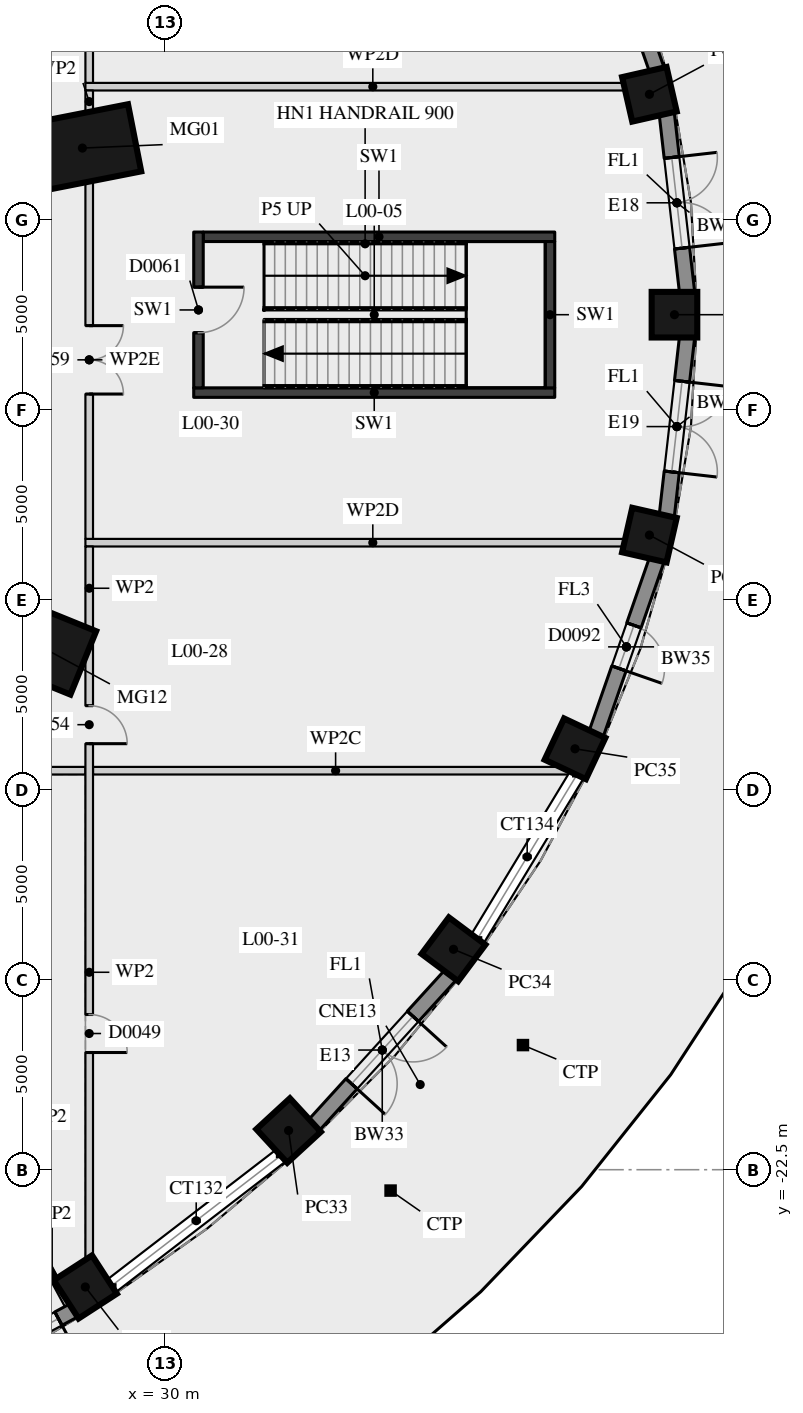
"""IFC4 building model, lengths in metres.
Left out: names, types, materials, properties, quantities, classifications, styles, units other than length and angle.
Written with IfcOpenShell. Run it as: python <this file> out.ifc"""

import sys

from ifc_helpers import new_model, si_unit, direction, frame, frame_2d, origin, origin_2d, place, context, subcontext, project, spatial, rectangle, hollow_circle, extrude, element, fill, save


model = new_model("IFC4")
c1 = context("Model", 3, precision=1e-05, world=origin(), true_north=direction((0.0, 1.0)))
c2 = subcontext(c1, "Body", "Model", "MODEL_VIEW")
j1 = project(units=[si_unit("LENGTHUNIT", "METRE"), si_unit("PLANEANGLEUNIT", "RADIAN")], contexts=[c1])
p1 = place(None, origin())
s1 = spatial("IfcSite", under=j1, at=p1, CompositionType="ELEMENT")
p2 = place(p1, origin())
s2 = spatial("IfcBuilding", under=s1, at=p2, CompositionType="ELEMENT")
p3 = place(p2, origin())
s3 = spatial("IfcBuildingStorey", under=s2, at=p3, CompositionType="ELEMENT", Elevation=0.0)
for number, where, z_axis, x_axis in (
    (1, (27.821, 4.385, 0.0), (0.0, 0.0, 1.0), (0.981, 0.193, 0.0)),
    (2, (26.546, -8.636, 0.0), (0.0, 0.0, 1.0), (0.927, -0.376, 0.0)),
):
    element("IfcColumn", number, at=place(p3, frame(where, z_axis=z_axis, x_axis=x_axis)), inside=s3, PredefinedType="COLUMN", context=c2, shape_type="SweptSolid", body=[
        extrude(rectangle(XDim=2.8, YDim=1.8, at=origin_2d()), origin(), (0.0, 0.0, 1.0), 7.5),
    ])
for number, where, z_axis, x_axis in (
    (3, (43.4, 0.0, 0.0), (0.0, 0.0, 1.0), (1.0, 0.0, 0.0)),
    (4, (42.741, 5.8, 0.0), (0.0, 0.0, 1.0), (0.975, 0.222, 0.0)),
    (5, (27.897, -25.586, 0.0), (0.0, 0.0, 1.0), (0.544, -0.839, 0.0)),
    (6, (33.246, -21.469, 0.0), (0.0, 0.0, 1.0), (0.677, -0.736, 0.0)),
    (7, (37.585, -16.7, 0.0), (0.0, 0.0, 1.0), (0.801, -0.599, 0.0)),
    (8, (40.783, -11.424, 0.0), (0.0, 0.0, 1.0), (0.905, -0.426, 0.0)),
    (9, (42.741, -5.8, 0.0), (0.0, 0.0, 1.0), (0.975, -0.222, 0.0)),
):
    element("IfcColumn", number, at=place(p3, frame(where, z_axis=z_axis, x_axis=x_axis)), inside=s3, PredefinedType="COLUMN", context=c2, shape_type="SweptSolid", body=[
        extrude(rectangle(XDim=1.2, YDim=1.2, at=origin_2d()), origin(), (0.0, 0.0, 1.0), 7.5),
    ])
p4 = place(p3, frame((43.734, 0.57, 0.0), z_axis=(0.0, 0.0, 1.0), x_axis=(-0.112954392721, 0.993600173694, 0.0)))
e10 = element("IfcWall", 10, at=p4, inside=s3, PredefinedType="SOLIDWALL", context=c2, shape_type="SweptSolid", body=[
    extrude(rectangle(XDim=4.779, YDim=0.4, at=frame_2d((2.389, 0.0))), origin(), (0.0, 0.0, 1.0), 6.19),
])
p5 = place(p4, frame((1.189, 0.0, 0.0)))
e11 = element("IfcOpeningElement", 11, at=p5, cuts=e10, PredefinedType="OPENING", context=c2, shape_type="SweptSolid", body=[
    extrude(rectangle(XDim=2.4, YDim=2.2, at=frame_2d((1.2, 1.1))), frame((0.0, 0.21, 0.0), z_axis=(0.0, -1.0, 0.0), x_axis=(1.0, 0.0, 0.0)), (0.0, 0.0, 1.0), 0.42),
])
p6 = place(p4, frame((1.189, 0.0, 2.6)))
e12 = element("IfcOpeningElement", 12, at=p6, cuts=e10, PredefinedType="OPENING", context=c2, shape_type="SweptSolid", body=[
    extrude(rectangle(XDim=2.4, YDim=3.49, at=frame_2d((1.2, 1.745))), frame((0.0, 0.21, 0.0), z_axis=(0.0, -1.0, 0.0), x_axis=(1.0, 0.0, 0.0)), (0.0, 0.0, 1.0), 0.42),
])
p7 = place(p3, frame((42.941, 6.43, 0.0), z_axis=(0.0, 0.0, 1.0), x_axis=(-0.328772164332, 0.944409267193, 0.0)))
e13 = element("IfcWall", 13, at=p7, inside=s3, PredefinedType="SOLIDWALL", context=c2, shape_type="SweptSolid", body=[
    extrude(rectangle(XDim=4.894, YDim=0.4, at=frame_2d((2.447, 0.0))), origin(), (0.0, 0.0, 1.0), 6.19),
])
p8 = place(p7, frame((0.647, 0.0, 0.0)))
e14 = element("IfcOpeningElement", 14, at=p8, cuts=e13, PredefinedType="OPENING", context=c2, shape_type="SweptSolid", body=[
    extrude(rectangle(XDim=3.6, YDim=4.5, at=frame_2d((1.8, 2.25))), frame((0.0, 0.21, 0.0), z_axis=(0.0, -1.0, 0.0), x_axis=(1.0, 0.0, 0.0)), (0.0, 0.0, 1.0), 0.42),
])
p9 = place(p7, frame((0.647, 0.0, 4.9)))
e15 = element("IfcOpeningElement", 15, at=p9, cuts=e13, PredefinedType="OPENING", context=c2, shape_type="SweptSolid", body=[
    extrude(rectangle(XDim=3.6, YDim=1.19, at=frame_2d((1.8, 0.595))), frame((0.0, 0.21, 0.0), z_axis=(0.0, -1.0, 0.0), x_axis=(1.0, 0.0, 0.0)), (0.0, 0.0, 1.0), 0.42),
])
p10 = place(p3, frame((22.366, -29.019, 0.0), z_axis=(0.0, 0.0, 1.0), x_axis=(0.880313157301, 0.474393028072, 0.0)))
e16 = element("IfcWall", 16, at=p10, inside=s3, PredefinedType="SOLIDWALL", context=c2, shape_type="SweptSolid", body=[
    extrude(rectangle(XDim=5.958, YDim=0.4, at=frame_2d((2.979, 0.0))), origin(), (0.0, 0.0, 1.0), 6.19),
])
p11 = place(p10, frame((3.079, 0.0, 0.0)))
e17 = element("IfcOpeningElement", 17, at=p11, cuts=e16, PredefinedType="OPENING", context=c2, shape_type="SweptSolid", body=[
    extrude(rectangle(XDim=2.4, YDim=2.2, at=frame_2d((1.2, 1.1))), frame((0.0, 0.21, 0.0), z_axis=(0.0, -1.0, 0.0), x_axis=(1.0, 0.0, 0.0)), (0.0, 0.0, 1.0), 0.42),
])
p12 = place(p10, frame((3.079, 0.0, 2.6)))
e18 = element("IfcOpeningElement", 18, at=p12, cuts=e16, PredefinedType="OPENING", context=c2, shape_type="SweptSolid", body=[
    extrude(rectangle(XDim=2.4, YDim=3.49, at=frame_2d((1.2, 1.745))), frame((0.0, 0.21, 0.0), z_axis=(0.0, -1.0, 0.0), x_axis=(1.0, 0.0, 0.0)), (0.0, 0.0, 1.0), 0.42),
])
p13 = place(p3, frame((33.902, -21.339, 0.0), z_axis=(0.0, 0.0, 1.0), x_axis=(0.672941720846, 0.739695505153, 0.0)))
e19 = element("IfcWall", 19, at=p13, inside=s3, PredefinedType="SOLIDWALL", context=c2, shape_type="SweptSolid", body=[
    extrude(rectangle(XDim=5.376, YDim=0.4, at=frame_2d((2.688, 0.0))), origin(), (0.0, 0.0, 1.0), 6.19),
])
p14 = place(p13, frame((1.488, 0.0, 0.0)))
e20 = element("IfcOpeningElement", 20, at=p14, cuts=e19, PredefinedType="OPENING", context=c2, shape_type="SweptSolid", body=[
    extrude(rectangle(XDim=2.4, YDim=2.2, at=frame_2d((1.2, 1.1))), frame((0.0, 0.21, 0.0), z_axis=(0.0, -1.0, 0.0), x_axis=(1.0, 0.0, 0.0)), (0.0, 0.0, 1.0), 0.42),
])
p15 = place(p13, frame((1.488, 0.0, 2.6)))
e21 = element("IfcOpeningElement", 21, at=p15, cuts=e19, PredefinedType="OPENING", context=c2, shape_type="SweptSolid", body=[
    extrude(rectangle(XDim=2.4, YDim=3.49, at=frame_2d((1.2, 1.745))), frame((0.0, 0.21, 0.0), z_axis=(0.0, -1.0, 0.0), x_axis=(1.0, 0.0, 0.0)), (0.0, 0.0, 1.0), 0.42),
])
for number, where, z_axis, x_axis in (
    (22, (35.93, -23.049, -0.2), (0.0, 0.0, 1.0), (1.0, 0.0, 0.0)),
    (23, (39.413, -19.22, -0.2), (0.0, 0.0, 1.0), (1.0, 0.0, 0.0)),
):
    element("IfcColumn", number, at=place(p3, frame(where, z_axis=z_axis, x_axis=x_axis)), inside=s3, PredefinedType="COLUMN", context=c2, shape_type="SweptSolid", body=[
        extrude(hollow_circle(Radius=0.084, WallThickness=0.008, at=origin_2d()), origin(), (0.0, 0.0, 1.0), 4.755),
    ])
p16 = place(p3, frame((41.332, -11.052, 0.0), z_axis=(0.0, 0.0, 1.0), x_axis=(0.328772164332, 0.944409267193, 0.0)))
e24 = element("IfcWall", 24, at=p16, inside=s3, PredefinedType="SOLIDWALL", context=c2, shape_type="SweptSolid", body=[
    extrude(rectangle(XDim=4.894, YDim=0.4, at=frame_2d((2.447, 0.0))), origin(), (0.0, 0.0, 1.0), 6.19),
])
p17 = place(p16, frame((1.847, 0.0, 0.0)))
e25 = element("IfcOpeningElement", 25, at=p17, cuts=e24, PredefinedType="OPENING", context=c2, shape_type="SweptSolid", body=[
    extrude(rectangle(XDim=1.2, YDim=2.1, at=frame_2d((0.6, 1.05))), frame((0.0, 0.21, 0.0), z_axis=(0.0, -1.0, 0.0), x_axis=(1.0, 0.0, 0.0)), (0.0, 0.0, 1.0), 0.42),
])
p18 = place(p16, frame((1.847, 0.0, 2.5)))
e26 = element("IfcOpeningElement", 26, at=p18, cuts=e24, PredefinedType="OPENING", context=c2, shape_type="SweptSolid", body=[
    extrude(rectangle(XDim=1.2, YDim=3.59, at=frame_2d((0.6, 1.795))), frame((0.0, 0.21, 0.0), z_axis=(0.0, -1.0, 0.0), x_axis=(1.0, 0.0, 0.0)), (0.0, 0.0, 1.0), 0.42),
])
p19 = place(p3, frame((43.194, -5.319, 0.0), z_axis=(0.0, 0.0, 1.0), x_axis=(0.112954392721, 0.993600173694, 0.0)))
e27 = element("IfcWall", 27, at=p19, inside=s3, PredefinedType="SOLIDWALL", context=c2, shape_type="SweptSolid", body=[
    extrude(rectangle(XDim=4.779, YDim=0.4, at=frame_2d((2.389, 0.0))), origin(), (0.0, 0.0, 1.0), 6.19),
])
p20 = place(p19, frame((1.189, 0.0, 0.0)))
e28 = element("IfcOpeningElement", 28, at=p20, cuts=e27, PredefinedType="OPENING", context=c2, shape_type="SweptSolid", body=[
    extrude(rectangle(XDim=2.4, YDim=2.2, at=frame_2d((1.2, 1.1))), frame((0.0, 0.21, 0.0), z_axis=(0.0, -1.0, 0.0), x_axis=(1.0, 0.0, 0.0)), (0.0, 0.0, 1.0), 0.42),
])
p21 = place(p19, frame((1.189, 0.0, 2.6)))
e29 = element("IfcOpeningElement", 29, at=p21, cuts=e27, PredefinedType="OPENING", context=c2, shape_type="SweptSolid", body=[
    extrude(rectangle(XDim=2.4, YDim=3.49, at=frame_2d((1.2, 1.745))), frame((0.0, 0.21, 0.0), z_axis=(0.0, -1.0, 0.0), x_axis=(1.0, 0.0, 0.0)), (0.0, 0.0, 1.0), 0.42),
])
p22 = place(p3, frame((27.505, -26.163, 0.0), z_axis=(0.0, 0.0, 1.0), x_axis=(-0.474409096955, 0.880304497731, 0.0)))
e30 = element("IfcWall", 30, at=p22, inside=s3, PredefinedType="PARTITIONING", context=c2, shape_type="SweptSolid", body=[
    extrude(rectangle(XDim=2.024, YDim=0.2, at=frame_2d((1.012, 0.0))), origin(), (0.0, 0.0, 1.0), 7.09),
])
p23 = place(p3, frame((19.1, -12.0, 0.0), z_axis=(0.0, 0.0, 1.0), x_axis=(1.0, 0.0, 0.0)))
e31 = element("IfcWall", 31, at=p23, inside=s3, PredefinedType="PARTITIONING", context=c2, shape_type="SweptSolid", body=[
    extrude(rectangle(XDim=8.8, YDim=0.2, at=frame_2d((4.4, 0.0))), origin(), (0.0, 0.0, 1.0), 7.09),
])
p24 = place(p23, frame((4.4, 0.0, 0.0)))
e32 = element("IfcOpeningElement", 32, at=p24, cuts=e31, PredefinedType="OPENING", context=c2, shape_type="SweptSolid", body=[
    extrude(rectangle(XDim=1.0, YDim=2.1, at=frame_2d((0.5, 1.05))), frame((0.0, 0.11, 0.0), z_axis=(0.0, -1.0, 0.0), x_axis=(1.0, 0.0, 0.0)), (0.0, 0.0, 1.0), 0.22),
])
p25 = place(p3, frame((28.1, -12.0, 0.0), z_axis=(0.0, 0.0, 1.0), x_axis=(1.0, 0.0, 0.0)))
e33 = element("IfcWall", 33, at=p25, inside=s3, PredefinedType="PARTITIONING", context=c2, shape_type="SweptSolid", body=[
    extrude(rectangle(XDim=12.767, YDim=0.2, at=frame_2d((6.383, 0.0))), origin(), (0.0, 0.0, 1.0), 6.19),
])
p26 = place(p3, frame((27.9, -6.0, 0.0), z_axis=(0.0, 0.0, 1.0), x_axis=(1.0, 0.0, 0.0)))
e34 = element("IfcWall", 34, at=p26, inside=s3, PredefinedType="PARTITIONING", context=c2, shape_type="SweptSolid", body=[
    extrude(rectangle(XDim=15.125, YDim=0.2, at=frame_2d((7.562, 0.0))), origin(), (0.0, 0.0, 1.0), 6.09),
])
p27 = place(p3, frame((30.75, -2.05, 0.0), z_axis=(0.0, 0.0, 1.0), x_axis=(1.0, 0.0, 0.0)))
e35 = element("IfcWall", 35, at=p27, inside=s3, PredefinedType="SOLIDWALL", context=c2, shape_type="SweptSolid", body=[
    extrude(rectangle(XDim=9.5, YDim=0.25, at=frame_2d((4.75, 0.0))), origin(), (0.0, 0.0, 1.0), 7.09),
])
p28 = place(p3, frame((31.0, 2.05, 0.0), z_axis=(0.0, 0.0, 1.0), x_axis=(1.0, 0.0, 0.0)))
e36 = element("IfcWall", 36, at=p28, inside=s3, PredefinedType="SOLIDWALL", context=c2, shape_type="SweptSolid", body=[
    extrude(rectangle(XDim=9.25, YDim=0.25, at=frame_2d((4.625, 0.0))), origin(), (0.0, 0.0, 1.0), 7.09),
])
p29 = place(p3, frame((27.9, 6.0, 0.0), z_axis=(0.0, 0.0, 1.0), x_axis=(1.0, 0.0, 0.0)))
e37 = element("IfcWall", 37, at=p29, inside=s3, PredefinedType="PARTITIONING", context=c2, shape_type="SweptSolid", body=[
    extrude(rectangle(XDim=15.125, YDim=0.2, at=frame_2d((7.562, 0.0))), origin(), (0.0, 0.0, 1.0), 6.09),
])
p30 = place(p3, frame((28.0, -25.932, 0.0), z_axis=(0.0, 0.0, 1.0), x_axis=(0.0, 1.0, 0.0)))
e38 = element("IfcWall", 38, at=p30, inside=s3, PredefinedType="PARTITIONING", context=c2, shape_type="SweptSolid", body=[
    extrude(rectangle(XDim=17.255, YDim=0.2, at=frame_2d((8.627, 0.0))), origin(), (0.0, 0.0, 1.0), 7.09),
])
p31 = place(p30, frame((14.643, 0.0, 0.0)))
e39 = element("IfcOpeningElement", 39, at=p31, cuts=e38, PredefinedType="OPENING", context=c2, shape_type="SweptSolid", body=[
    extrude(rectangle(XDim=1.0, YDim=2.1, at=frame_2d((0.5, 1.05))), frame((0.0, 0.11, 0.0), z_axis=(0.0, -1.0, 0.0), x_axis=(1.0, 0.0, 0.0)), (0.0, 0.0, 1.0), 0.22),
])
p32 = place(p30, frame((6.516, 0.0, 0.0)))
e40 = element("IfcOpeningElement", 40, at=p32, cuts=e38, PredefinedType="OPENING", context=c2, shape_type="SweptSolid", body=[
    extrude(rectangle(XDim=1.0, YDim=2.1, at=frame_2d((0.5, 1.05))), frame((0.0, 0.11, 0.0), z_axis=(0.0, -1.0, 0.0), x_axis=(1.0, 0.0, 0.0)), (0.0, 0.0, 1.0), 0.22),
])
p33 = place(p3, frame((28.0, -8.298, 0.0), z_axis=(0.0, 0.0, 1.0), x_axis=(0.0, 1.0, 0.0)))
e41 = element("IfcWall", 41, at=p33, inside=s3, PredefinedType="PARTITIONING", context=c2, shape_type="SweptSolid", body=[
    extrude(rectangle(XDim=2.198, YDim=0.2, at=frame_2d((1.099, 0.0))), origin(), (0.0, 0.0, 1.0), 7.09),
])
p34 = place(p3, frame((28.0, -5.9, 0.0), z_axis=(0.0, 0.0, 1.0), x_axis=(0.0, 1.0, 0.0)))
e42 = element("IfcWall", 42, at=p34, inside=s3, PredefinedType="PARTITIONING", context=c2, shape_type="SweptSolid", body=[
    extrude(rectangle(XDim=9.424, YDim=0.2, at=frame_2d((4.712, 0.0))), origin(), (0.0, 0.0, 1.0), 5.94),
])
p35 = place(p34, frame((3.812, 0.0, 0.0)))
e43 = element("IfcOpeningElement", 43, at=p35, cuts=e42, PredefinedType="OPENING", context=c2, shape_type="SweptSolid", body=[
    extrude(rectangle(XDim=1.8, YDim=2.1, at=frame_2d((0.9, 1.05))), frame((0.0, 0.11, 0.0), z_axis=(0.0, -1.0, 0.0), x_axis=(1.0, 0.0, 0.0)), (0.0, 0.0, 1.0), 0.22),
])
p36 = place(p3, frame((28.0, 5.315, 0.0), z_axis=(0.0, 0.0, 1.0), x_axis=(0.0, 1.0, 0.0)))
e44 = element("IfcWall", 44, at=p36, inside=s3, PredefinedType="PARTITIONING", context=c2, shape_type="SweptSolid", body=[
    extrude(rectangle(XDim=0.584, YDim=0.2, at=frame_2d((0.292, 0.0))), origin(), (0.0, 0.0, 1.0), 7.09),
])
p37 = place(p3, frame((28.0, 6.1, 0.0), z_axis=(0.0, 0.0, 1.0), x_axis=(0.0, 1.0, 0.0)))
e45 = element("IfcWall", 45, at=p37, inside=s3, PredefinedType="PARTITIONING", context=c2, shape_type="SweptSolid", body=[
    extrude(rectangle(XDim=5.8, YDim=0.2, at=frame_2d((2.9, 0.0))), origin(), (0.0, 0.0, 1.0), 7.09),
])
p38 = place(p37, frame((2.0, 0.0, 0.0)))
e46 = element("IfcOpeningElement", 46, at=p38, cuts=e45, PredefinedType="OPENING", context=c2, shape_type="SweptSolid", body=[
    extrude(rectangle(XDim=1.8, YDim=2.1, at=frame_2d((0.9, 1.05))), frame((0.0, 0.11, 0.0), z_axis=(0.0, -1.0, 0.0), x_axis=(1.0, 0.0, 0.0)), (0.0, 0.0, 1.0), 0.22),
])
p39 = place(p3, frame((30.875, -1.925, 0.0), z_axis=(0.0, 0.0, 1.0), x_axis=(0.0, 1.0, 0.0)))
e47 = element("IfcWall", 47, at=p39, inside=s3, PredefinedType="SOLIDWALL", context=c2, shape_type="SweptSolid", body=[
    extrude(rectangle(XDim=4.1, YDim=0.25, at=frame_2d((2.05, 0.0))), origin(), (0.0, 0.0, 1.0), 7.09),
])
p40 = place(p39, frame((1.45, 0.0, 0.0)))
e48 = element("IfcOpeningElement", 48, at=p40, cuts=e47, PredefinedType="OPENING", context=c2, shape_type="SweptSolid", body=[
    extrude(rectangle(XDim=1.2, YDim=2.1, at=frame_2d((0.6, 1.05))), frame((0.0, 0.135, 0.0), z_axis=(0.0, -1.0, 0.0), x_axis=(1.0, 0.0, 0.0)), (0.0, 0.0, 1.0), 0.27),
])
p41 = place(p3, frame((40.125, -1.925, 0.0), z_axis=(0.0, 0.0, 1.0), x_axis=(0.0, 1.0, 0.0)))
e49 = element("IfcWall", 49, at=p41, inside=s3, PredefinedType="SOLIDWALL", context=c2, shape_type="SweptSolid", body=[
    extrude(rectangle(XDim=3.85, YDim=0.25, at=frame_2d((1.925, 0.0))), origin(), (0.0, 0.0, 1.0), 7.09),
])
p42 = place(p5, frame((2.4, 0.0, 0.0), z_axis=(0.0, 0.0, 1.0), x_axis=(-1.0, 0.0, 0.0)))
e50 = element("IfcDoor", 50, at=p42, inside=s3, OperationType="DOUBLE_DOOR_SINGLE_SWING", PredefinedType="DOOR", context=c2, shape_type="SweptSolid", body=[
    extrude(rectangle(XDim=2.4, YDim=2.2, at=frame_2d((1.2, 1.1))), frame((0.0, 0.05, 0.0), z_axis=(0.0, -1.0, 0.0), x_axis=(1.0, 0.0, 0.0)), (0.0, 0.0, 1.0), 0.05),
])
fill(e11, e50)
p43 = place(p6, origin())
e51 = element("IfcWindow", 51, at=p43, inside=s3, PartitioningType="SINGLE_PANEL", PredefinedType="WINDOW", context=c2, shape_type="SweptSolid", body=[
    extrude(rectangle(XDim=2.4, YDim=3.49, at=frame_2d((1.2, 1.745))), frame((0.0, 0.01, 0.0), z_axis=(0.0, -1.0, 0.0), x_axis=(1.0, 0.0, 0.0)), (0.0, 0.0, 1.0), 0.06),
])
fill(e12, e51)
p44 = place(p11, frame((2.4, 0.0, 0.0), z_axis=(0.0, 0.0, 1.0), x_axis=(-1.0, 0.0, 0.0)))
e52 = element("IfcDoor", 52, at=p44, inside=s3, OperationType="DOUBLE_DOOR_SINGLE_SWING", PredefinedType="DOOR", context=c2, shape_type="SweptSolid", body=[
    extrude(rectangle(XDim=2.4, YDim=2.2, at=frame_2d((1.2, 1.1))), frame((0.0, 0.05, 0.0), z_axis=(0.0, -1.0, 0.0), x_axis=(1.0, 0.0, 0.0)), (0.0, 0.0, 1.0), 0.05),
])
fill(e17, e52)
p45 = place(p12, origin())
e53 = element("IfcWindow", 53, at=p45, inside=s3, PartitioningType="SINGLE_PANEL", PredefinedType="WINDOW", context=c2, shape_type="SweptSolid", body=[
    extrude(rectangle(XDim=2.4, YDim=3.49, at=frame_2d((1.2, 1.745))), frame((0.0, 0.01, 0.0), z_axis=(0.0, -1.0, 0.0), x_axis=(1.0, 0.0, 0.0)), (0.0, 0.0, 1.0), 0.06),
])
fill(e18, e53)
p46 = place(p14, frame((2.4, 0.0, 0.0), z_axis=(0.0, 0.0, 1.0), x_axis=(-1.0, 0.0, 0.0)))
e54 = element("IfcDoor", 54, at=p46, inside=s3, OperationType="DOUBLE_DOOR_SINGLE_SWING", PredefinedType="DOOR", context=c2, shape_type="SweptSolid", body=[
    extrude(rectangle(XDim=2.4, YDim=2.2, at=frame_2d((1.2, 1.1))), frame((0.0, 0.05, 0.0), z_axis=(0.0, -1.0, 0.0), x_axis=(1.0, 0.0, 0.0)), (0.0, 0.0, 1.0), 0.05),
])
fill(e20, e54)
p47 = place(p15, origin())
e55 = element("IfcWindow", 55, at=p47, inside=s3, PartitioningType="SINGLE_PANEL", PredefinedType="WINDOW", context=c2, shape_type="SweptSolid", body=[
    extrude(rectangle(XDim=2.4, YDim=3.49, at=frame_2d((1.2, 1.745))), frame((0.0, 0.01, 0.0), z_axis=(0.0, -1.0, 0.0), x_axis=(1.0, 0.0, 0.0)), (0.0, 0.0, 1.0), 0.06),
])
fill(e21, e55)
p48 = place(p17, frame((1.2, 0.0, 0.0), z_axis=(0.0, 0.0, 1.0), x_axis=(-1.0, 0.0, 0.0)))
e56 = element("IfcDoor", 56, at=p48, inside=s3, OperationType="SINGLE_SWING_RIGHT", PredefinedType="DOOR", context=c2, shape_type="SweptSolid", body=[
    extrude(rectangle(XDim=1.2, YDim=2.1, at=frame_2d((0.6, 1.05))), frame((0.0, 0.05, 0.0), z_axis=(0.0, -1.0, 0.0), x_axis=(1.0, 0.0, 0.0)), (0.0, 0.0, 1.0), 0.05),
])
fill(e25, e56)
p49 = place(p18, origin())
e57 = element("IfcWindow", 57, at=p49, inside=s3, PartitioningType="SINGLE_PANEL", PredefinedType="WINDOW", context=c2, shape_type="SweptSolid", body=[
    extrude(rectangle(XDim=1.2, YDim=3.59, at=frame_2d((0.6, 1.795))), frame((0.0, 0.01, 0.0), z_axis=(0.0, -1.0, 0.0), x_axis=(1.0, 0.0, 0.0)), (0.0, 0.0, 1.0), 0.06),
])
fill(e26, e57)
p50 = place(p20, frame((2.4, 0.0, 0.0), z_axis=(0.0, 0.0, 1.0), x_axis=(-1.0, 0.0, 0.0)))
e58 = element("IfcDoor", 58, at=p50, inside=s3, OperationType="DOUBLE_DOOR_SINGLE_SWING", PredefinedType="DOOR", context=c2, shape_type="SweptSolid", body=[
    extrude(rectangle(XDim=2.4, YDim=2.2, at=frame_2d((1.2, 1.1))), frame((0.0, 0.05, 0.0), z_axis=(0.0, -1.0, 0.0), x_axis=(1.0, 0.0, 0.0)), (0.0, 0.0, 1.0), 0.05),
])
fill(e28, e58)
p51 = place(p21, origin())
e59 = element("IfcWindow", 59, at=p51, inside=s3, PartitioningType="SINGLE_PANEL", PredefinedType="WINDOW", context=c2, shape_type="SweptSolid", body=[
    extrude(rectangle(XDim=2.4, YDim=3.49, at=frame_2d((1.2, 1.745))), frame((0.0, 0.01, 0.0), z_axis=(0.0, -1.0, 0.0), x_axis=(1.0, 0.0, 0.0)), (0.0, 0.0, 1.0), 0.06),
])
fill(e29, e59)
p52 = place(p40, origin())
e60 = element("IfcDoor", 60, at=p52, inside=s3, OperationType="SINGLE_SWING_LEFT", PredefinedType="DOOR", context=c2, shape_type="SweptSolid", body=[
    extrude(rectangle(XDim=1.2, YDim=2.1, at=frame_2d((0.6, 1.05))), frame((0.0, 0.025, 0.0), z_axis=(0.0, -1.0, 0.0), x_axis=(1.0, 0.0, 0.0)), (0.0, 0.0, 1.0), 0.05),
])
fill(e48, e60)
p53 = place(p35, origin())
e61 = element("IfcDoor", 61, at=p53, inside=s3, OperationType="DOUBLE_DOOR_SINGLE_SWING", PredefinedType="DOOR", context=c2, shape_type="SweptSolid", body=[
    extrude(rectangle(XDim=1.8, YDim=2.1, at=frame_2d((0.9, 1.05))), frame((0.0, 0.025, 0.0), z_axis=(0.0, -1.0, 0.0), x_axis=(1.0, 0.0, 0.0)), (0.0, 0.0, 1.0), 0.05),
])
fill(e43, e61)
p54 = place(p31, origin())
e62 = element("IfcDoor", 62, at=p54, inside=s3, OperationType="SINGLE_SWING_RIGHT", PredefinedType="DOOR", context=c2, shape_type="SweptSolid", body=[
    extrude(rectangle(XDim=1.0, YDim=2.1, at=frame_2d((0.5, 1.05))), frame((0.0, 0.025, 0.0), z_axis=(0.0, -1.0, 0.0), x_axis=(1.0, 0.0, 0.0)), (0.0, 0.0, 1.0), 0.05),
])
fill(e39, e62)
p55 = place(p32, origin())
e63 = element("IfcDoor", 63, at=p55, inside=s3, OperationType="SINGLE_SWING_RIGHT", PredefinedType="DOOR", context=c2, shape_type="SweptSolid", body=[
    extrude(rectangle(XDim=1.0, YDim=2.1, at=frame_2d((0.5, 1.05))), frame((0.0, 0.025, 0.0), z_axis=(0.0, -1.0, 0.0), x_axis=(1.0, 0.0, 0.0)), (0.0, 0.0, 1.0), 0.05),
])
fill(e40, e63)
save(model, sys.argv[1])
